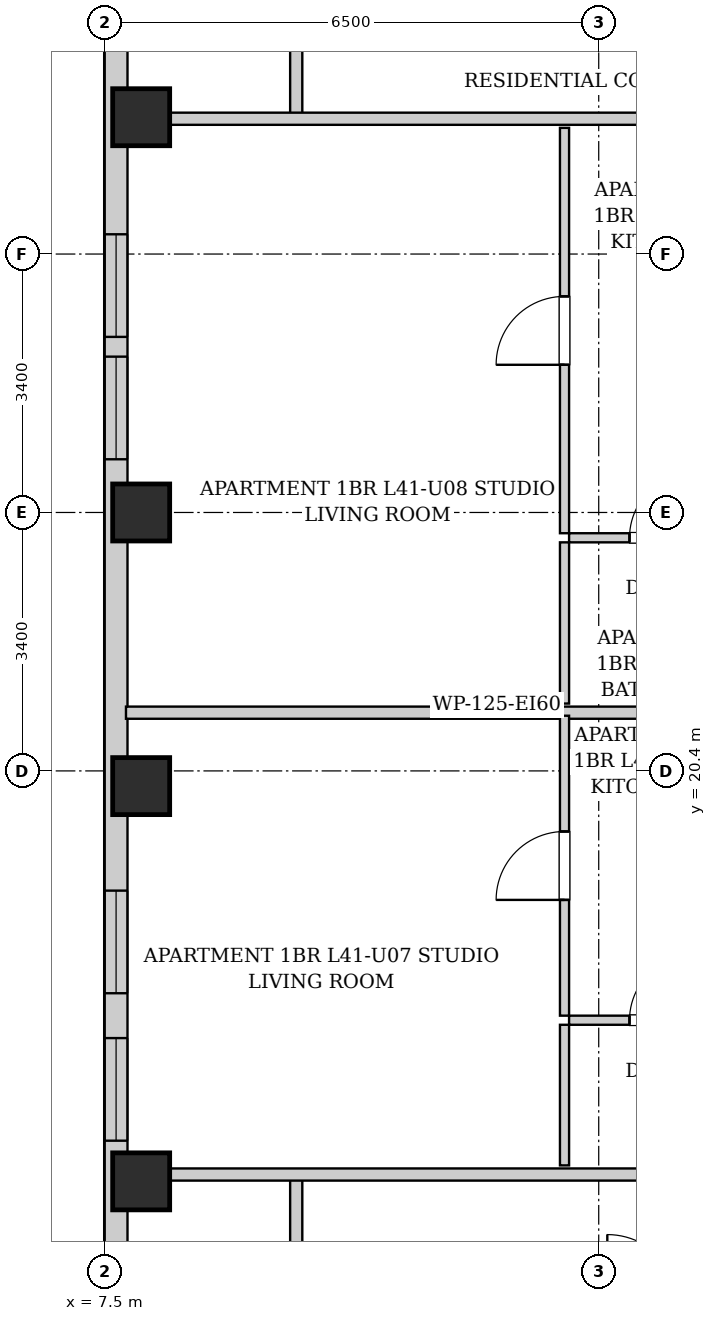
"""IFC4 building model, lengths in metres.
Left out: names, types, materials, properties, quantities, classifications, styles, units other than length and angle.
Written with IfcOpenShell. Run it as: python <this file> out.ifc"""

import sys

from ifc_helpers import new_model, si_unit, direction, frame, frame_2d, origin, origin_2d, place, context, subcontext, project, spatial, rectangle, extrude, element, fill, save


model = new_model("IFC4")
c1 = context("Model", 3, precision=1e-05, world=origin(), true_north=direction((0.0, 1.0)))
c2 = subcontext(c1, "Body", "Model", "MODEL_VIEW")
j1 = project(units=[si_unit("LENGTHUNIT", "METRE"), si_unit("PLANEANGLEUNIT", "RADIAN")], contexts=[c1])
p1 = place(None, origin())
s1 = spatial("IfcSite", under=j1, at=p1, CompositionType="ELEMENT")
p2 = place(p1, origin())
s2 = spatial("IfcBuilding", under=s1, at=p2, CompositionType="ELEMENT")
p3 = place(p2, frame((0.0, 0.0, 143.9)))
s3 = spatial("IfcBuildingStorey", under=s2, at=p3, CompositionType="ELEMENT", Elevation=143.9)
for number, where, z_axis, x_axis in (
    (1, (7.98, 15.0, 0.0), (0.0, 0.0, 1.0), (1.0, 0.0, 0.0)),
    (2, (7.98, 20.2, 0.0), (0.0, 0.0, 1.0), (1.0, 0.0, 0.0)),
    (3, (7.98, 23.8, 0.0), (0.0, 0.0, 1.0), (1.0, 0.0, 0.0)),
    (4, (7.98, 29.0, 0.0), (0.0, 0.0, 1.0), (1.0, 0.0, 0.0)),
):
    element("IfcColumn", number, at=place(p3, frame(where, z_axis=z_axis, x_axis=x_axis)), inside=s3, PredefinedType="COLUMN", context=c2, shape_type="SweptSolid", body=[
        extrude(rectangle(XDim=0.75, YDim=0.75, at=origin_2d()), origin(), (0.0, 0.0, 1.0), 3.25),
    ])
p4 = place(p3, frame((7.65, 6.3, 0.0), z_axis=(0.0, 0.0, 1.0), x_axis=(0.0, 1.0, 0.0)))
e5 = element("IfcWall", 5, at=p4, inside=s3, PredefinedType="SOLIDWALL", context=c2, shape_type="SweptSolid", body=[
    extrude(rectangle(XDim=34.5, YDim=0.3, at=frame_2d((17.25, 0.0))), origin(), (0.0, 0.0, 1.0), 2.99),
])
p5 = place(p4, frame((1.575, 0.0, 0.55)))
e6 = element("IfcOpeningElement", 6, at=p5, cuts=e5, PredefinedType="OPENING", context=c2, shape_type="SweptSolid", body=[
    extrude(rectangle(XDim=1.35, YDim=1.2, at=frame_2d((0.675, 0.6))), frame((0.0, 0.16, 0.0), z_axis=(0.0, -1.0, 0.0), x_axis=(1.0, 0.0, 0.0)), (0.0, 0.0, 1.0), 0.32),
])
p6 = place(p4, frame((30.075, 0.0, 0.55)))
e7 = element("IfcOpeningElement", 7, at=p6, cuts=e5, PredefinedType="OPENING", context=c2, shape_type="SweptSolid", body=[
    extrude(rectangle(XDim=1.35, YDim=1.2, at=frame_2d((0.675, 0.6))), frame((0.0, 0.16, 0.0), z_axis=(0.0, -1.0, 0.0), x_axis=(1.0, 0.0, 0.0)), (0.0, 0.0, 1.0), 0.32),
])
p7 = place(p4, frame((28.235, 0.0, 0.55)))
e8 = element("IfcOpeningElement", 8, at=p7, cuts=e5, PredefinedType="OPENING", context=c2, shape_type="SweptSolid", body=[
    extrude(rectangle(XDim=1.35, YDim=1.2, at=frame_2d((0.675, 0.6))), frame((0.0, 0.16, 0.0), z_axis=(0.0, -1.0, 0.0), x_axis=(1.0, 0.0, 0.0)), (0.0, 0.0, 1.0), 0.32),
])
p8 = place(p4, frame((11.175, 0.0, 0.55)))
e9 = element("IfcOpeningElement", 9, at=p8, cuts=e5, PredefinedType="OPENING", context=c2, shape_type="SweptSolid", body=[
    extrude(rectangle(XDim=1.35, YDim=1.2, at=frame_2d((0.675, 0.6))), frame((0.0, 0.16, 0.0), z_axis=(0.0, -1.0, 0.0), x_axis=(1.0, 0.0, 0.0)), (0.0, 0.0, 1.0), 0.32),
])
p9 = place(p4, frame((9.235, 0.0, 0.55)))
e10 = element("IfcOpeningElement", 10, at=p9, cuts=e5, PredefinedType="OPENING", context=c2, shape_type="SweptSolid", body=[
    extrude(rectangle(XDim=1.35, YDim=1.2, at=frame_2d((0.675, 0.6))), frame((0.0, 0.16, 0.0), z_axis=(0.0, -1.0, 0.0), x_axis=(1.0, 0.0, 0.0)), (0.0, 0.0, 1.0), 0.32),
])
p10 = place(p4, frame((18.2, 0.0, 0.55)))
e11 = element("IfcOpeningElement", 11, at=p10, cuts=e5, PredefinedType="OPENING", context=c2, shape_type="SweptSolid", body=[
    extrude(rectangle(XDim=1.35, YDim=1.2, at=frame_2d((0.675, 0.6))), frame((0.0, 0.16, 0.0), z_axis=(0.0, -1.0, 0.0), x_axis=(1.0, 0.0, 0.0)), (0.0, 0.0, 1.0), 0.32),
])
p11 = place(p4, frame((19.81, 0.0, 0.55)))
e12 = element("IfcOpeningElement", 12, at=p11, cuts=e5, PredefinedType="OPENING", context=c2, shape_type="SweptSolid", body=[
    extrude(rectangle(XDim=1.35, YDim=1.2, at=frame_2d((0.675, 0.6))), frame((0.0, 0.16, 0.0), z_axis=(0.0, -1.0, 0.0), x_axis=(1.0, 0.0, 0.0)), (0.0, 0.0, 1.0), 0.32),
])
for number, where, z_axis, x_axis in (
    (13, (10.02, 13.35, 0.0), (0.0, 0.0, 1.0), (0.0, 1.0, 0.0)),
    (14, (10.02, 28.98, 0.0), (0.0, 0.0, 1.0), (0.0, 1.0, 0.0)),
):
    element("IfcWall", number, at=place(p3, frame(where, z_axis=z_axis, x_axis=x_axis)), inside=s3, PredefinedType="PARTITIONING", context=c2, shape_type="SweptSolid", body=[
        extrude(rectangle(XDim=1.74, YDim=0.16, at=frame_2d((0.87, 0.0))), origin(), (0.0, 0.0, 1.0), 2.99),
    ])
for number, where, z_axis, x_axis in (
    (15, (7.78, 15.09, 0.0), (0.0, 0.0, 1.0), (1.0, 0.0, 0.0)),
    (16, (7.78, 28.98, 0.0), (0.0, 0.0, 1.0), (1.0, 0.0, 0.0)),
):
    element("IfcWall", number, at=place(p3, frame(where, z_axis=z_axis, x_axis=x_axis)), inside=s3, PredefinedType="PARTITIONING", context=c2, shape_type="SweptSolid", body=[
        extrude(rectangle(XDim=8.36, YDim=0.16, at=frame_2d((4.18, 0.0))), origin(), (0.0, 0.0, 1.0), 2.426),
    ])
p12 = place(p3, frame((7.78, 21.166, 0.0), z_axis=(0.0, 0.0, 1.0), x_axis=(1.0, 0.0, 0.0)))
e17 = element("IfcWall", 17, at=p12, inside=s3, PredefinedType="PARTITIONING", context=c2, shape_type="SweptSolid", body=[
    extrude(rectangle(XDim=8.28, YDim=0.16, at=frame_2d((4.14, 0.0))), origin(), (0.0, 0.0, 1.0), 2.99),
])
p13 = place(p3, frame((13.61, 17.12, 0.0), z_axis=(0.0, 0.0, 1.0), x_axis=(1.0, 0.0, 0.0)))
e18 = element("IfcWall", 18, at=p13, inside=s3, PredefinedType="PARTITIONING", context=c2, shape_type="SweptSolid", body=[
    extrude(rectangle(XDim=2.45, YDim=0.12, at=frame_2d((1.225, 0.0))), origin(), (0.0, 0.0, 1.0), 2.99),
])
p14 = place(p13, frame((0.795, 0.0, 0.0)))
e19 = element("IfcOpeningElement", 19, at=p14, cuts=e18, PredefinedType="OPENING", context=c2, shape_type="SweptSolid", body=[
    extrude(rectangle(XDim=0.86, YDim=2.05, at=frame_2d((0.43, 1.025))), frame((0.0, 0.07, 0.0), z_axis=(0.0, -1.0, 0.0), x_axis=(1.0, 0.0, 0.0)), (0.0, 0.0, 1.0), 0.14),
])
p15 = place(p3, frame((13.55, 15.21, 0.0), z_axis=(0.0, 0.0, 1.0), x_axis=(0.0, 1.0, 0.0)))
e20 = element("IfcWall", 20, at=p15, inside=s3, PredefinedType="PARTITIONING", context=c2, shape_type="SweptSolid", body=[
    extrude(rectangle(XDim=1.85, YDim=0.12, at=frame_2d((0.925, 0.0))), origin(), (0.0, 0.0, 1.0), 2.99),
])
p16 = place(p3, frame((13.55, 17.18, 0.0), z_axis=(0.0, 0.0, 1.0), x_axis=(0.0, 1.0, 0.0)))
e21 = element("IfcWall", 21, at=p16, inside=s3, PredefinedType="PARTITIONING", context=c2, shape_type="SweptSolid", body=[
    extrude(rectangle(XDim=3.946, YDim=0.12, at=frame_2d((1.973, 0.0))), origin(), (0.0, 0.0, 1.0), 2.99),
])
p17 = place(p16, frame((1.523, 0.0, 0.0)))
e22 = element("IfcOpeningElement", 22, at=p17, cuts=e21, PredefinedType="OPENING", context=c2, shape_type="SweptSolid", body=[
    extrude(rectangle(XDim=0.9, YDim=2.05, at=frame_2d((0.45, 1.025))), frame((0.0, 0.07, 0.0), z_axis=(0.0, -1.0, 0.0), x_axis=(1.0, 0.0, 0.0)), (0.0, 0.0, 1.0), 0.14),
])
p18 = place(p3, frame((13.61, 23.467, 0.0), z_axis=(0.0, 0.0, 1.0), x_axis=(1.0, 0.0, 0.0)))
e23 = element("IfcWall", 23, at=p18, inside=s3, PredefinedType="PARTITIONING", context=c2, shape_type="SweptSolid", body=[
    extrude(rectangle(XDim=2.45, YDim=0.12, at=frame_2d((1.225, 0.0))), origin(), (0.0, 0.0, 1.0), 2.99),
])
p19 = place(p18, frame((0.795, 0.0, 0.0)))
e24 = element("IfcOpeningElement", 24, at=p19, cuts=e23, PredefinedType="OPENING", context=c2, shape_type="SweptSolid", body=[
    extrude(rectangle(XDim=0.86, YDim=2.05, at=frame_2d((0.43, 1.025))), frame((0.0, 0.07, 0.0), z_axis=(0.0, -1.0, 0.0), x_axis=(1.0, 0.0, 0.0)), (0.0, 0.0, 1.0), 0.14),
])
p20 = place(p3, frame((13.55, 21.286, 0.0), z_axis=(0.0, 0.0, 1.0), x_axis=(0.0, 1.0, 0.0)))
e25 = element("IfcWall", 25, at=p20, inside=s3, PredefinedType="PARTITIONING", context=c2, shape_type="SweptSolid", body=[
    extrude(rectangle(XDim=2.121, YDim=0.12, at=frame_2d((1.061, 0.0))), origin(), (0.0, 0.0, 1.0), 2.99),
])
p21 = place(p3, frame((13.55, 23.527, 0.0), z_axis=(0.0, 0.0, 1.0), x_axis=(0.0, 1.0, 0.0)))
e26 = element("IfcWall", 26, at=p21, inside=s3, PredefinedType="PARTITIONING", context=c2, shape_type="SweptSolid", body=[
    extrude(rectangle(XDim=5.333, YDim=0.12, at=frame_2d((2.667, 0.0))), origin(), (0.0, 0.0, 1.0), 2.99),
])
p22 = place(p21, frame((2.216, 0.0, 0.0)))
e27 = element("IfcOpeningElement", 27, at=p22, cuts=e26, PredefinedType="OPENING", context=c2, shape_type="SweptSolid", body=[
    extrude(rectangle(XDim=0.9, YDim=2.05, at=frame_2d((0.45, 1.025))), frame((0.0, 0.07, 0.0), z_axis=(0.0, -1.0, 0.0), x_axis=(1.0, 0.0, 0.0)), (0.0, 0.0, 1.0), 0.14),
])
p23 = place(p14, origin())
e28 = element("IfcDoor", 28, at=p23, inside=s3, OperationType="SINGLE_SWING_RIGHT", PredefinedType="DOOR", context=c2, shape_type="SweptSolid", body=[
    extrude(rectangle(XDim=0.86, YDim=2.05, at=frame_2d((0.43, 1.025))), frame((0.0, 0.025, 0.0), z_axis=(0.0, -1.0, 0.0), x_axis=(1.0, 0.0, 0.0)), (0.0, 0.0, 1.0), 0.05),
])
fill(e19, e28)
p24 = place(p17, origin())
e29 = element("IfcDoor", 29, at=p24, inside=s3, OperationType="SINGLE_SWING_LEFT", PredefinedType="DOOR", context=c2, shape_type="SweptSolid", body=[
    extrude(rectangle(XDim=0.9, YDim=2.05, at=frame_2d((0.45, 1.025))), frame((0.0, 0.025, 0.0), z_axis=(0.0, -1.0, 0.0), x_axis=(1.0, 0.0, 0.0)), (0.0, 0.0, 1.0), 0.05),
])
fill(e22, e29)
p25 = place(p19, origin())
e30 = element("IfcDoor", 30, at=p25, inside=s3, OperationType="SINGLE_SWING_RIGHT", PredefinedType="DOOR", context=c2, shape_type="SweptSolid", body=[
    extrude(rectangle(XDim=0.86, YDim=2.05, at=frame_2d((0.43, 1.025))), frame((0.0, 0.025, 0.0), z_axis=(0.0, -1.0, 0.0), x_axis=(1.0, 0.0, 0.0)), (0.0, 0.0, 1.0), 0.05),
])
fill(e24, e30)
p26 = place(p22, origin())
e31 = element("IfcDoor", 31, at=p26, inside=s3, OperationType="SINGLE_SWING_LEFT", PredefinedType="DOOR", context=c2, shape_type="SweptSolid", body=[
    extrude(rectangle(XDim=0.9, YDim=2.05, at=frame_2d((0.45, 1.025))), frame((0.0, 0.025, 0.0), z_axis=(0.0, -1.0, 0.0), x_axis=(1.0, 0.0, 0.0)), (0.0, 0.0, 1.0), 0.05),
])
fill(e27, e31)
p27 = place(p8, origin())
e32 = element("IfcWindow", 32, at=p27, inside=s3, PartitioningType="SINGLE_PANEL", PredefinedType="WINDOW", context=c2, shape_type="SweptSolid", body=[
    extrude(rectangle(XDim=1.35, YDim=1.2, at=frame_2d((0.675, 0.6))), frame((0.0, 0.03, 0.0), z_axis=(0.0, -1.0, 0.0), x_axis=(1.0, 0.0, 0.0)), (0.0, 0.0, 1.0), 0.06),
])
fill(e9, e32)
p28 = place(p9, origin())
e33 = element("IfcWindow", 33, at=p28, inside=s3, PartitioningType="SINGLE_PANEL", PredefinedType="WINDOW", context=c2, shape_type="SweptSolid", body=[
    extrude(rectangle(XDim=1.35, YDim=1.2, at=frame_2d((0.675, 0.6))), frame((0.0, 0.03, 0.0), z_axis=(0.0, -1.0, 0.0), x_axis=(1.0, 0.0, 0.0)), (0.0, 0.0, 1.0), 0.06),
])
fill(e10, e33)
p29 = place(p10, origin())
e34 = element("IfcWindow", 34, at=p29, inside=s3, PartitioningType="SINGLE_PANEL", PredefinedType="WINDOW", context=c2, shape_type="SweptSolid", body=[
    extrude(rectangle(XDim=1.35, YDim=1.2, at=frame_2d((0.675, 0.6))), frame((0.0, 0.03, 0.0), z_axis=(0.0, -1.0, 0.0), x_axis=(1.0, 0.0, 0.0)), (0.0, 0.0, 1.0), 0.06),
])
fill(e11, e34)
p30 = place(p11, origin())
e35 = element("IfcWindow", 35, at=p30, inside=s3, PartitioningType="SINGLE_PANEL", PredefinedType="WINDOW", context=c2, shape_type="SweptSolid", body=[
    extrude(rectangle(XDim=1.35, YDim=1.2, at=frame_2d((0.675, 0.6))), frame((0.0, 0.03, 0.0), z_axis=(0.0, -1.0, 0.0), x_axis=(1.0, 0.0, 0.0)), (0.0, 0.0, 1.0), 0.06),
])
fill(e12, e35)
save(model, sys.argv[1])
